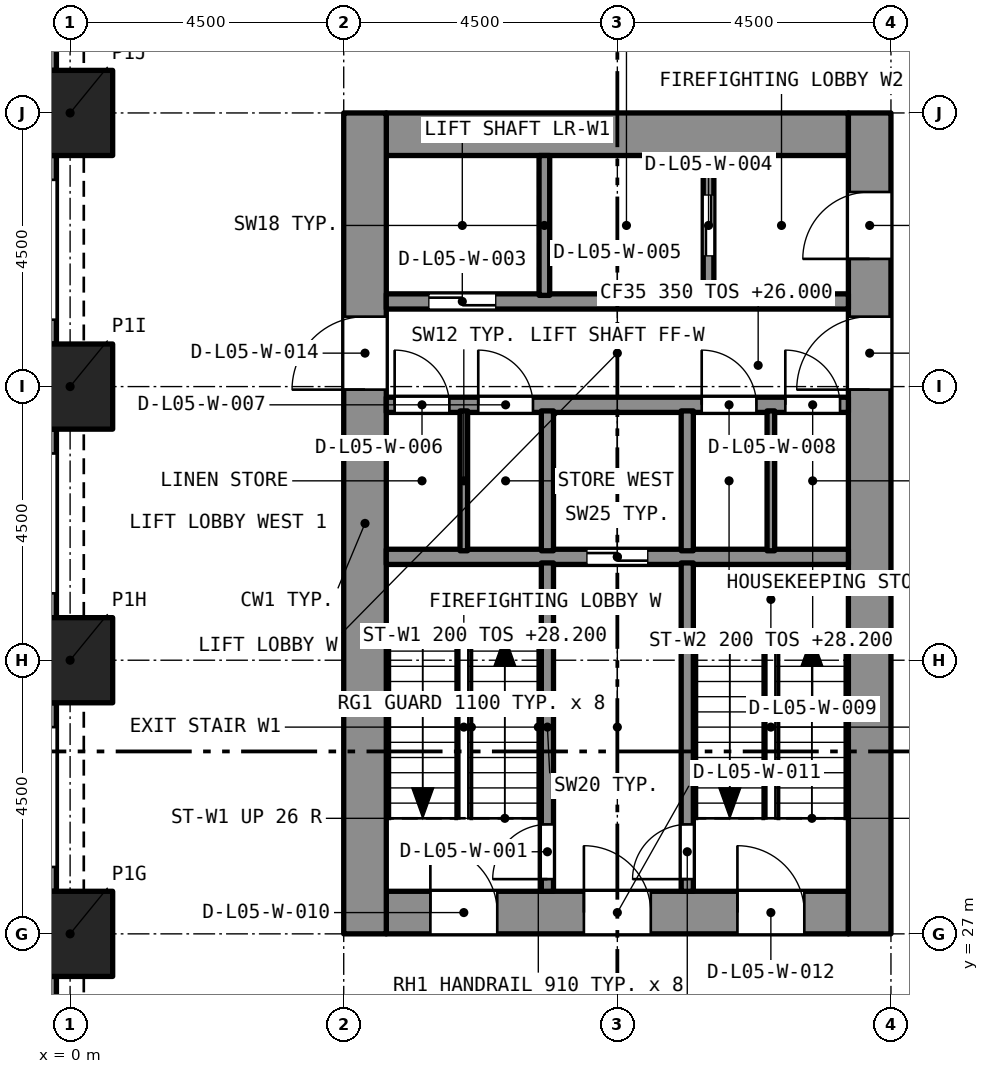
"""IFC4 building model, lengths in metres.
Left out: names, types, materials, properties, quantities, classifications, styles, units other than length and angle.
Written with IfcOpenShell. Run it as: python <this file> out.ifc"""

import sys

from ifc_helpers import new_model, si_unit, direction, frame, frame_2d, origin, origin_2d, place, context, subcontext, project, spatial, rectangle, extrude, element, fill, save


model = new_model("IFC4")
c1 = context("Model", 3, precision=1e-05, world=origin(), true_north=direction((0.0, 1.0)))
c2 = subcontext(c1, "Body", "Model", "MODEL_VIEW")
j1 = project(units=[si_unit("LENGTHUNIT", "METRE"), si_unit("PLANEANGLEUNIT", "RADIAN")], contexts=[c1])
p1 = place(None, origin())
s1 = spatial("IfcSite", under=j1, at=p1, CompositionType="ELEMENT")
p2 = place(p1, origin())
s2 = spatial("IfcBuilding", under=s1, at=p2, CompositionType="ELEMENT")
p3 = place(p2, frame((0.0, 0.0, 26.0)))
s3 = spatial("IfcBuildingStorey", under=s2, at=p3, CompositionType="ELEMENT", Elevation=26.0)
for number, where, z_axis, x_axis in (
    (1, (0.0, 27.0, 0.0), (0.0, 0.0, 1.0), (1.0, 0.0, 0.0)),
    (2, (0.0, 31.5, 0.0), (0.0, 0.0, 1.0), (1.0, 0.0, 0.0)),
    (3, (0.0, 36.0, 0.0), (0.0, 0.0, 1.0), (1.0, 0.0, 0.0)),
    (4, (0.0, 40.5, 0.0), (0.0, 0.0, 1.0), (1.0, 0.0, 0.0)),
):
    element("IfcColumn", number, at=place(p3, frame(where, z_axis=z_axis, x_axis=x_axis)), inside=s3, PredefinedType="COLUMN", context=c2, shape_type="SweptSolid", body=[
        extrude(rectangle(XDim=1.4, YDim=1.4, at=origin_2d()), origin(), (0.0, 0.0, 1.0), 4.4),
    ])
p4 = place(p3, frame((5.2, 27.35, 0.0), z_axis=(0.0, 0.0, 1.0), x_axis=(1.0, 0.0, 0.0)))
e5 = element("IfcWall", 5, at=p4, inside=s3, PredefinedType="SOLIDWALL", context=c2, shape_type="SweptSolid", body=[
    extrude(rectangle(XDim=7.6, YDim=0.7, at=frame_2d((3.8, 0.0))), origin(), (0.0, 0.0, 1.0), 4.4),
])
p5 = place(p4, frame((0.725, 0.0, 0.0)))
e6 = element("IfcOpeningElement", 6, at=p5, cuts=e5, PredefinedType="OPENING", context=c2, shape_type="SweptSolid", body=[
    extrude(rectangle(XDim=1.1, YDim=2.1, at=frame_2d((0.55, 1.05))), frame((0.0, 0.36, 0.0), z_axis=(0.0, -1.0, 0.0), x_axis=(1.0, 0.0, 0.0)), (0.0, 0.0, 1.0), 0.72),
])
p6 = place(p4, frame((3.25, 0.0, 0.0)))
e7 = element("IfcOpeningElement", 7, at=p6, cuts=e5, PredefinedType="OPENING", context=c2, shape_type="SweptSolid", body=[
    extrude(rectangle(XDim=1.1, YDim=2.1, at=frame_2d((0.55, 1.05))), frame((0.0, 0.36, 0.0), z_axis=(0.0, -1.0, 0.0), x_axis=(1.0, 0.0, 0.0)), (0.0, 0.0, 1.0), 0.72),
])
p7 = place(p4, frame((5.775, 0.0, 0.0)))
e8 = element("IfcOpeningElement", 8, at=p7, cuts=e5, PredefinedType="OPENING", context=c2, shape_type="SweptSolid", body=[
    extrude(rectangle(XDim=1.1, YDim=2.1, at=frame_2d((0.55, 1.05))), frame((0.0, 0.36, 0.0), z_axis=(0.0, -1.0, 0.0), x_axis=(1.0, 0.0, 0.0)), (0.0, 0.0, 1.0), 0.72),
])
p8 = place(p3, frame((5.2, 40.15, 0.0), z_axis=(0.0, 0.0, 1.0), x_axis=(1.0, 0.0, 0.0)))
e9 = element("IfcWall", 9, at=p8, inside=s3, PredefinedType="SOLIDWALL", context=c2, shape_type="SweptSolid", body=[
    extrude(rectangle(XDim=7.6, YDim=0.7, at=frame_2d((3.8, 0.0))), origin(), (0.0, 0.0, 1.0), 4.4),
])
p9 = place(p3, frame((4.85, 27.0, 0.0), z_axis=(0.0, 0.0, 1.0), x_axis=(0.0, 1.0, 0.0)))
e10 = element("IfcWall", 10, at=p9, inside=s3, PredefinedType="SOLIDWALL", context=c2, shape_type="SweptSolid", body=[
    extrude(rectangle(XDim=13.5, YDim=0.7, at=frame_2d((6.75, 0.0))), origin(), (0.0, 0.0, 1.0), 4.4),
])
p10 = place(p9, frame((8.95, 0.0, 0.0)))
e11 = element("IfcOpeningElement", 11, at=p10, cuts=e10, PredefinedType="OPENING", context=c2, shape_type="SweptSolid", body=[
    extrude(rectangle(XDim=1.2, YDim=2.1, at=frame_2d((0.6, 1.05))), frame((0.0, 0.36, 0.0), z_axis=(0.0, -1.0, 0.0), x_axis=(1.0, 0.0, 0.0)), (0.0, 0.0, 1.0), 0.72),
])
p11 = place(p3, frame((13.15, 27.0, 0.0), z_axis=(0.0, 0.0, 1.0), x_axis=(0.0, 1.0, 0.0)))
e12 = element("IfcWall", 12, at=p11, inside=s3, PredefinedType="SOLIDWALL", context=c2, shape_type="SweptSolid", body=[
    extrude(rectangle(XDim=13.5, YDim=0.7, at=frame_2d((6.75, 0.0))), origin(), (0.0, 0.0, 1.0), 4.4),
])
p12 = place(p11, frame((11.1, 0.0, 0.0)))
e13 = element("IfcOpeningElement", 13, at=p12, cuts=e12, PredefinedType="OPENING", context=c2, shape_type="SweptSolid", body=[
    extrude(rectangle(XDim=1.1, YDim=2.1, at=frame_2d((0.55, 1.05))), frame((0.0, 0.36, 0.0), z_axis=(0.0, -1.0, 0.0), x_axis=(1.0, 0.0, 0.0)), (0.0, 0.0, 1.0), 0.72),
])
p13 = place(p11, frame((8.95, 0.0, 0.0)))
e14 = element("IfcOpeningElement", 14, at=p13, cuts=e12, PredefinedType="OPENING", context=c2, shape_type="SweptSolid", body=[
    extrude(rectangle(XDim=1.2, YDim=2.1, at=frame_2d((0.6, 1.05))), frame((0.0, 0.36, 0.0), z_axis=(0.0, -1.0, 0.0), x_axis=(1.0, 0.0, 0.0)), (0.0, 0.0, 1.0), 0.72),
])
p14 = place(p3, frame((-0.375, 41.2, 0.0), z_axis=(0.0, 0.0, 1.0), x_axis=(0.0, 1.0, 0.0)))
e15 = element("IfcWall", 15, at=p14, inside=s3, PredefinedType="SOLIDWALL", context=c2, shape_type="SweptSolid", body=[
    extrude(rectangle(XDim=3.1, YDim=0.3, at=frame_2d((1.55, 0.0))), origin(), (0.0, 0.0, 1.0), 4.4),
])
p15 = place(p14, frame((0.4, 0.0, 0.45)))
e16 = element("IfcOpeningElement", 16, at=p15, cuts=e15, PredefinedType="OPENING", context=c2, shape_type="SweptSolid", body=[
    extrude(rectangle(XDim=2.3, YDim=2.55, at=frame_2d((1.15, 1.275))), frame((0.0, 0.16, 0.0), z_axis=(0.0, -1.0, 0.0), x_axis=(1.0, 0.0, 0.0)), (0.0, 0.0, 1.0), 0.32),
])
p16 = place(p3, frame((-0.375, 36.7, 0.0), z_axis=(0.0, 0.0, 1.0), x_axis=(0.0, 1.0, 0.0)))
e17 = element("IfcWall", 17, at=p16, inside=s3, PredefinedType="SOLIDWALL", context=c2, shape_type="SweptSolid", body=[
    extrude(rectangle(XDim=3.1, YDim=0.3, at=frame_2d((1.55, 0.0))), origin(), (0.0, 0.0, 1.0), 4.4),
])
p17 = place(p16, frame((0.4, 0.0, 0.45)))
e18 = element("IfcOpeningElement", 18, at=p17, cuts=e17, PredefinedType="OPENING", context=c2, shape_type="SweptSolid", body=[
    extrude(rectangle(XDim=2.3, YDim=2.55, at=frame_2d((1.15, 1.275))), frame((0.0, 0.16, 0.0), z_axis=(0.0, -1.0, 0.0), x_axis=(1.0, 0.0, 0.0)), (0.0, 0.0, 1.0), 0.32),
])
p18 = place(p3, frame((-0.375, 32.2, 0.0), z_axis=(0.0, 0.0, 1.0), x_axis=(0.0, 1.0, 0.0)))
e19 = element("IfcWall", 19, at=p18, inside=s3, PredefinedType="SOLIDWALL", context=c2, shape_type="SweptSolid", body=[
    extrude(rectangle(XDim=3.1, YDim=0.3, at=frame_2d((1.55, 0.0))), origin(), (0.0, 0.0, 1.0), 4.4),
])
p19 = place(p18, frame((0.4, 0.0, 0.45)))
e20 = element("IfcOpeningElement", 20, at=p19, cuts=e19, PredefinedType="OPENING", context=c2, shape_type="SweptSolid", body=[
    extrude(rectangle(XDim=2.3, YDim=2.55, at=frame_2d((1.15, 1.275))), frame((0.0, 0.16, 0.0), z_axis=(0.0, -1.0, 0.0), x_axis=(1.0, 0.0, 0.0)), (0.0, 0.0, 1.0), 0.32),
])
p20 = place(p3, frame((-0.375, 27.7, 0.0), z_axis=(0.0, 0.0, 1.0), x_axis=(0.0, 1.0, 0.0)))
e21 = element("IfcWall", 21, at=p20, inside=s3, PredefinedType="SOLIDWALL", context=c2, shape_type="SweptSolid", body=[
    extrude(rectangle(XDim=3.1, YDim=0.3, at=frame_2d((1.55, 0.0))), origin(), (0.0, 0.0, 1.0), 4.4),
])
p21 = place(p20, frame((0.4, 0.0, 0.45)))
e22 = element("IfcOpeningElement", 22, at=p21, cuts=e21, PredefinedType="OPENING", context=c2, shape_type="SweptSolid", body=[
    extrude(rectangle(XDim=2.3, YDim=2.55, at=frame_2d((1.15, 1.275))), frame((0.0, 0.16, 0.0), z_axis=(0.0, -1.0, 0.0), x_axis=(1.0, 0.0, 0.0)), (0.0, 0.0, 1.0), 0.32),
])
p22 = place(p3, frame((-0.375, 23.2, 0.0), z_axis=(0.0, 0.0, 1.0), x_axis=(0.0, 1.0, 0.0)))
e23 = element("IfcWall", 23, at=p22, inside=s3, PredefinedType="SOLIDWALL", context=c2, shape_type="SweptSolid", body=[
    extrude(rectangle(XDim=3.1, YDim=0.3, at=frame_2d((1.55, 0.0))), origin(), (0.0, 0.0, 1.0), 4.4),
])
p23 = place(p22, frame((0.4, 0.0, 0.45)))
e24 = element("IfcOpeningElement", 24, at=p23, cuts=e23, PredefinedType="OPENING", context=c2, shape_type="SweptSolid", body=[
    extrude(rectangle(XDim=2.3, YDim=2.55, at=frame_2d((1.15, 1.275))), frame((0.0, 0.16, 0.0), z_axis=(0.0, -1.0, 0.0), x_axis=(1.0, 0.0, 0.0)), (0.0, 0.0, 1.0), 0.32),
])
p24 = place(p3, frame((5.2, 33.2, 0.0), z_axis=(0.0, 0.0, 1.0), x_axis=(1.0, 0.0, 0.0)))
e25 = element("IfcWall", 25, at=p24, inside=s3, PredefinedType="SOLIDWALL", context=c2, shape_type="SweptSolid", body=[
    extrude(rectangle(XDim=7.6, YDim=0.25, at=frame_2d((3.8, 0.0))), origin(), (0.0, 0.0, 1.0), 4.1),
])
p25 = place(p24, frame((3.3, 0.0, 0.0)))
e26 = element("IfcOpeningElement", 26, at=p25, cuts=e25, PredefinedType="OPENING", context=c2, shape_type="SweptSolid", body=[
    extrude(rectangle(XDim=1.0, YDim=2.1, at=frame_2d((0.5, 1.05))), frame((0.0, 0.135, 0.0), z_axis=(0.0, -1.0, 0.0), x_axis=(1.0, 0.0, 0.0)), (0.0, 0.0, 1.0), 0.27),
])
p26 = place(p3, frame((5.2, 35.7, 0.0), z_axis=(0.0, 0.0, 1.0), x_axis=(1.0, 0.0, 0.0)))
e27 = element("IfcWall", 27, at=p26, inside=s3, PredefinedType="SOLIDWALL", context=c2, shape_type="SweptSolid", body=[
    extrude(rectangle(XDim=7.6, YDim=0.25, at=frame_2d((3.8, 0.0))), origin(), (0.0, 0.0, 1.0), 4.1),
])
p27 = place(p26, frame((0.137, 0.0, 0.0)))
e28 = element("IfcOpeningElement", 28, at=p27, cuts=e27, PredefinedType="OPENING", context=c2, shape_type="SweptSolid", body=[
    extrude(rectangle(XDim=0.9, YDim=2.1, at=frame_2d((0.45, 1.05))), frame((0.0, 0.135, 0.0), z_axis=(0.0, -1.0, 0.0), x_axis=(1.0, 0.0, 0.0)), (0.0, 0.0, 1.0), 0.27),
])
p28 = place(p26, frame((1.512, 0.0, 0.0)))
e29 = element("IfcOpeningElement", 29, at=p28, cuts=e27, PredefinedType="OPENING", context=c2, shape_type="SweptSolid", body=[
    extrude(rectangle(XDim=0.9, YDim=2.1, at=frame_2d((0.45, 1.05))), frame((0.0, 0.135, 0.0), z_axis=(0.0, -1.0, 0.0), x_axis=(1.0, 0.0, 0.0)), (0.0, 0.0, 1.0), 0.27),
])
p29 = place(p26, frame((5.188, 0.0, 0.0)))
e30 = element("IfcOpeningElement", 30, at=p29, cuts=e27, PredefinedType="OPENING", context=c2, shape_type="SweptSolid", body=[
    extrude(rectangle(XDim=0.9, YDim=2.1, at=frame_2d((0.45, 1.05))), frame((0.0, 0.135, 0.0), z_axis=(0.0, -1.0, 0.0), x_axis=(1.0, 0.0, 0.0)), (0.0, 0.0, 1.0), 0.27),
])
p30 = place(p26, frame((6.562, 0.0, 0.0)))
e31 = element("IfcOpeningElement", 31, at=p30, cuts=e27, PredefinedType="OPENING", context=c2, shape_type="SweptSolid", body=[
    extrude(rectangle(XDim=0.9, YDim=2.1, at=frame_2d((0.45, 1.05))), frame((0.0, 0.135, 0.0), z_axis=(0.0, -1.0, 0.0), x_axis=(1.0, 0.0, 0.0)), (0.0, 0.0, 1.0), 0.27),
])
p31 = place(p3, frame((5.2, 37.4, 0.0), z_axis=(0.0, 0.0, 1.0), x_axis=(1.0, 0.0, 0.0)))
e32 = element("IfcWall", 32, at=p31, inside=s3, PredefinedType="SOLIDWALL", context=c2, shape_type="SweptSolid", body=[
    extrude(rectangle(XDim=7.6, YDim=0.25, at=frame_2d((3.8, 0.0))), origin(), (0.0, 0.0, 1.0), 4.1),
])
p32 = place(p31, frame((0.7, 0.0, 0.0)))
e33 = element("IfcOpeningElement", 33, at=p32, cuts=e32, PredefinedType="OPENING", context=c2, shape_type="SweptSolid", body=[
    extrude(rectangle(XDim=1.1, YDim=2.4, at=frame_2d((0.55, 1.2))), frame((0.0, 0.135, 0.0), z_axis=(0.0, -1.0, 0.0), x_axis=(1.0, 0.0, 0.0)), (0.0, 0.0, 1.0), 0.27),
])
p33 = place(p3, frame((7.85, 27.7, 0.0), z_axis=(0.0, 0.0, 1.0), x_axis=(0.0, 1.0, 0.0)))
e34 = element("IfcWall", 34, at=p33, inside=s3, PredefinedType="SOLIDWALL", context=c2, shape_type="SweptSolid", body=[
    extrude(rectangle(XDim=5.4, YDim=0.2, at=frame_2d((2.7, 0.0))), origin(), (0.0, 0.0, 1.0), 4.1),
])
p34 = place(p33, frame((0.2, 0.0, 0.0)))
e35 = element("IfcOpeningElement", 35, at=p34, cuts=e34, PredefinedType="OPENING", context=c2, shape_type="SweptSolid", body=[
    extrude(rectangle(XDim=0.9, YDim=2.1, at=frame_2d((0.45, 1.05))), frame((0.0, 0.11, 0.0), z_axis=(0.0, -1.0, 0.0), x_axis=(1.0, 0.0, 0.0)), (0.0, 0.0, 1.0), 0.22),
])
p35 = place(p3, frame((10.15, 27.7, 0.0), z_axis=(0.0, 0.0, 1.0), x_axis=(0.0, 1.0, 0.0)))
e36 = element("IfcWall", 36, at=p35, inside=s3, PredefinedType="SOLIDWALL", context=c2, shape_type="SweptSolid", body=[
    extrude(rectangle(XDim=5.4, YDim=0.2, at=frame_2d((2.7, 0.0))), origin(), (0.0, 0.0, 1.0), 4.1),
])
p36 = place(p35, frame((0.2, 0.0, 0.0)))
e37 = element("IfcOpeningElement", 37, at=p36, cuts=e36, PredefinedType="OPENING", context=c2, shape_type="SweptSolid", body=[
    extrude(rectangle(XDim=0.9, YDim=2.1, at=frame_2d((0.45, 1.05))), frame((0.0, 0.11, 0.0), z_axis=(0.0, -1.0, 0.0), x_axis=(1.0, 0.0, 0.0)), (0.0, 0.0, 1.0), 0.22),
])
for number, where, z_axis, x_axis in (
    (38, (7.85, 33.3, 0.0), (0.0, 0.0, 1.0), (0.0, 1.0, 0.0)),
    (39, (10.15, 33.3, 0.0), (0.0, 0.0, 1.0), (0.0, 1.0, 0.0)),
):
    element("IfcWall", number, at=place(p3, frame(where, z_axis=z_axis, x_axis=x_axis)), inside=s3, PredefinedType="SOLIDWALL", context=c2, shape_type="SweptSolid", body=[
        extrude(rectangle(XDim=2.3, YDim=0.2, at=frame_2d((1.15, 0.0))), origin(), (0.0, 0.0, 1.0), 4.1),
    ])
p37 = place(p3, frame((7.8, 37.5, 0.0), z_axis=(0.0, 0.0, 1.0), x_axis=(0.0, 1.0, 0.0)))
e40 = element("IfcWall", 40, at=p37, inside=s3, PredefinedType="SOLIDWALL", context=c2, shape_type="SweptSolid", body=[
    extrude(rectangle(XDim=2.3, YDim=0.175, at=frame_2d((1.15, 0.0))), origin(), (0.0, 0.0, 1.0), 4.1),
])
p38 = place(p3, frame((10.5, 37.5, 0.0), z_axis=(0.0, 0.0, 1.0), x_axis=(0.0, 1.0, 0.0)))
e41 = element("IfcWall", 41, at=p38, inside=s3, PredefinedType="SOLIDWALL", context=c2, shape_type="SweptSolid", body=[
    extrude(rectangle(XDim=2.3, YDim=0.175, at=frame_2d((1.15, 0.0))), origin(), (0.0, 0.0, 1.0), 4.1),
])
p39 = place(p38, frame((0.65, 0.0, 0.0)))
e42 = element("IfcOpeningElement", 42, at=p39, cuts=e41, PredefinedType="OPENING", context=c2, shape_type="SweptSolid", body=[
    extrude(rectangle(XDim=1.0, YDim=2.1, at=frame_2d((0.5, 1.05))), frame((0.0, 0.097, 0.0), z_axis=(0.0, -1.0, 0.0), x_axis=(1.0, 0.0, 0.0)), (0.0, 0.0, 1.0), 0.195),
])
for number, where, z_axis, x_axis in (
    (43, (6.475, 33.3, 0.0), (0.0, 0.0, 1.0), (0.0, 1.0, 0.0)),
    (44, (11.525, 33.3, 0.0), (0.0, 0.0, 1.0), (0.0, 1.0, 0.0)),
):
    element("IfcWall", number, at=place(p3, frame(where, z_axis=z_axis, x_axis=x_axis)), inside=s3, PredefinedType="PARTITIONING", context=c2, shape_type="SweptSolid", body=[
        extrude(rectangle(XDim=2.3, YDim=0.125, at=frame_2d((1.15, 0.0))), origin(), (0.0, 0.0, 1.0), 4.1),
    ])
p40 = place(p34, origin())
e45 = element("IfcDoor", 45, at=p40, inside=s3, OperationType="SINGLE_SWING_LEFT", PredefinedType="DOOR", context=c2, shape_type="SweptSolid", body=[
    extrude(rectangle(XDim=0.9, YDim=2.1, at=frame_2d((0.45, 1.05))), frame((0.0, 0.025, 0.0), z_axis=(0.0, -1.0, 0.0), x_axis=(1.0, 0.0, 0.0)), (0.0, 0.0, 1.0), 0.05),
])
fill(e35, e45)
p41 = place(p36, origin())
e46 = element("IfcDoor", 46, at=p41, inside=s3, OperationType="SINGLE_SWING_LEFT", PredefinedType="DOOR", context=c2, shape_type="SweptSolid", body=[
    extrude(rectangle(XDim=0.9, YDim=2.1, at=frame_2d((0.45, 1.05))), frame((0.0, 0.025, 0.0), z_axis=(0.0, -1.0, 0.0), x_axis=(1.0, 0.0, 0.0)), (0.0, 0.0, 1.0), 0.05),
])
fill(e37, e46)
p42 = place(p32, origin())
e47 = element("IfcDoor", 47, at=p42, inside=s3, OperationType="SLIDING_TO_LEFT", PredefinedType="DOOR", context=c2, shape_type="SweptSolid", body=[
    extrude(rectangle(XDim=1.1, YDim=2.4, at=frame_2d((0.55, 1.2))), frame((0.0, 0.025, 0.0), z_axis=(0.0, -1.0, 0.0), x_axis=(1.0, 0.0, 0.0)), (0.0, 0.0, 1.0), 0.05),
])
fill(e33, e47)
p43 = place(p39, origin())
e48 = element("IfcDoor", 48, at=p43, inside=s3, OperationType="SLIDING_TO_LEFT", PredefinedType="DOOR", context=c2, shape_type="SweptSolid", body=[
    extrude(rectangle(XDim=1.0, YDim=2.1, at=frame_2d((0.5, 1.05))), frame((0.0, 0.025, 0.0), z_axis=(0.0, -1.0, 0.0), x_axis=(1.0, 0.0, 0.0)), (0.0, 0.0, 1.0), 0.05),
])
fill(e42, e48)
p44 = place(p25, origin())
e49 = element("IfcDoor", 49, at=p44, inside=s3, OperationType="SLIDING_TO_LEFT", PredefinedType="DOOR", context=c2, shape_type="SweptSolid", body=[
    extrude(rectangle(XDim=1.0, YDim=2.1, at=frame_2d((0.5, 1.05))), frame((0.0, 0.025, 0.0), z_axis=(0.0, -1.0, 0.0), x_axis=(1.0, 0.0, 0.0)), (0.0, 0.0, 1.0), 0.05),
])
fill(e26, e49)
p45 = place(p27, origin())
e50 = element("IfcDoor", 50, at=p45, inside=s3, OperationType="SINGLE_SWING_LEFT", PredefinedType="DOOR", context=c2, shape_type="SweptSolid", body=[
    extrude(rectangle(XDim=0.9, YDim=2.1, at=frame_2d((0.45, 1.05))), frame((0.0, 0.025, 0.0), z_axis=(0.0, -1.0, 0.0), x_axis=(1.0, 0.0, 0.0)), (0.0, 0.0, 1.0), 0.05),
])
fill(e28, e50)
p46 = place(p28, origin())
e51 = element("IfcDoor", 51, at=p46, inside=s3, OperationType="SINGLE_SWING_LEFT", PredefinedType="DOOR", context=c2, shape_type="SweptSolid", body=[
    extrude(rectangle(XDim=0.9, YDim=2.1, at=frame_2d((0.45, 1.05))), frame((0.0, 0.025, 0.0), z_axis=(0.0, -1.0, 0.0), x_axis=(1.0, 0.0, 0.0)), (0.0, 0.0, 1.0), 0.05),
])
fill(e29, e51)
p47 = place(p29, origin())
e52 = element("IfcDoor", 52, at=p47, inside=s3, OperationType="SINGLE_SWING_LEFT", PredefinedType="DOOR", context=c2, shape_type="SweptSolid", body=[
    extrude(rectangle(XDim=0.9, YDim=2.1, at=frame_2d((0.45, 1.05))), frame((0.0, 0.025, 0.0), z_axis=(0.0, -1.0, 0.0), x_axis=(1.0, 0.0, 0.0)), (0.0, 0.0, 1.0), 0.05),
])
fill(e30, e52)
p48 = place(p30, origin())
e53 = element("IfcDoor", 53, at=p48, inside=s3, OperationType="SINGLE_SWING_LEFT", PredefinedType="DOOR", context=c2, shape_type="SweptSolid", body=[
    extrude(rectangle(XDim=0.9, YDim=2.1, at=frame_2d((0.45, 1.05))), frame((0.0, 0.025, 0.0), z_axis=(0.0, -1.0, 0.0), x_axis=(1.0, 0.0, 0.0)), (0.0, 0.0, 1.0), 0.05),
])
fill(e31, e53)
p49 = place(p5, origin())
e54 = element("IfcDoor", 54, at=p49, inside=s3, OperationType="SINGLE_SWING_LEFT", PredefinedType="DOOR", context=c2, shape_type="SweptSolid", body=[
    extrude(rectangle(XDim=1.1, YDim=2.1, at=frame_2d((0.55, 1.05))), frame((0.0, 0.025, 0.0), z_axis=(0.0, -1.0, 0.0), x_axis=(1.0, 0.0, 0.0)), (0.0, 0.0, 1.0), 0.05),
])
fill(e6, e54)
p50 = place(p6, origin())
e55 = element("IfcDoor", 55, at=p50, inside=s3, OperationType="SINGLE_SWING_LEFT", PredefinedType="DOOR", context=c2, shape_type="SweptSolid", body=[
    extrude(rectangle(XDim=1.1, YDim=2.1, at=frame_2d((0.55, 1.05))), frame((0.0, 0.025, 0.0), z_axis=(0.0, -1.0, 0.0), x_axis=(1.0, 0.0, 0.0)), (0.0, 0.0, 1.0), 0.05),
])
fill(e7, e55)
p51 = place(p7, origin())
e56 = element("IfcDoor", 56, at=p51, inside=s3, OperationType="SINGLE_SWING_LEFT", PredefinedType="DOOR", context=c2, shape_type="SweptSolid", body=[
    extrude(rectangle(XDim=1.1, YDim=2.1, at=frame_2d((0.55, 1.05))), frame((0.0, 0.025, 0.0), z_axis=(0.0, -1.0, 0.0), x_axis=(1.0, 0.0, 0.0)), (0.0, 0.0, 1.0), 0.05),
])
fill(e8, e56)
p52 = place(p12, origin())
e57 = element("IfcDoor", 57, at=p52, inside=s3, OperationType="SINGLE_SWING_LEFT", PredefinedType="DOOR", context=c2, shape_type="SweptSolid", body=[
    extrude(rectangle(XDim=1.1, YDim=2.1, at=frame_2d((0.55, 1.05))), frame((0.0, 0.025, 0.0), z_axis=(0.0, -1.0, 0.0), x_axis=(1.0, 0.0, 0.0)), (0.0, 0.0, 1.0), 0.05),
])
fill(e13, e57)
p53 = place(p10, origin())
e58 = element("IfcDoor", 58, at=p53, inside=s3, OperationType="SINGLE_SWING_LEFT", PredefinedType="DOOR", context=c2, shape_type="SweptSolid", body=[
    extrude(rectangle(XDim=1.2, YDim=2.1, at=frame_2d((0.6, 1.05))), frame((0.0, 0.025, 0.0), z_axis=(0.0, -1.0, 0.0), x_axis=(1.0, 0.0, 0.0)), (0.0, 0.0, 1.0), 0.05),
])
fill(e11, e58)
p54 = place(p13, origin())
e59 = element("IfcDoor", 59, at=p54, inside=s3, OperationType="SINGLE_SWING_LEFT", PredefinedType="DOOR", context=c2, shape_type="SweptSolid", body=[
    extrude(rectangle(XDim=1.2, YDim=2.1, at=frame_2d((0.6, 1.05))), frame((0.0, 0.025, 0.0), z_axis=(0.0, -1.0, 0.0), x_axis=(1.0, 0.0, 0.0)), (0.0, 0.0, 1.0), 0.05),
])
fill(e14, e59)
save(model, sys.argv[1])
